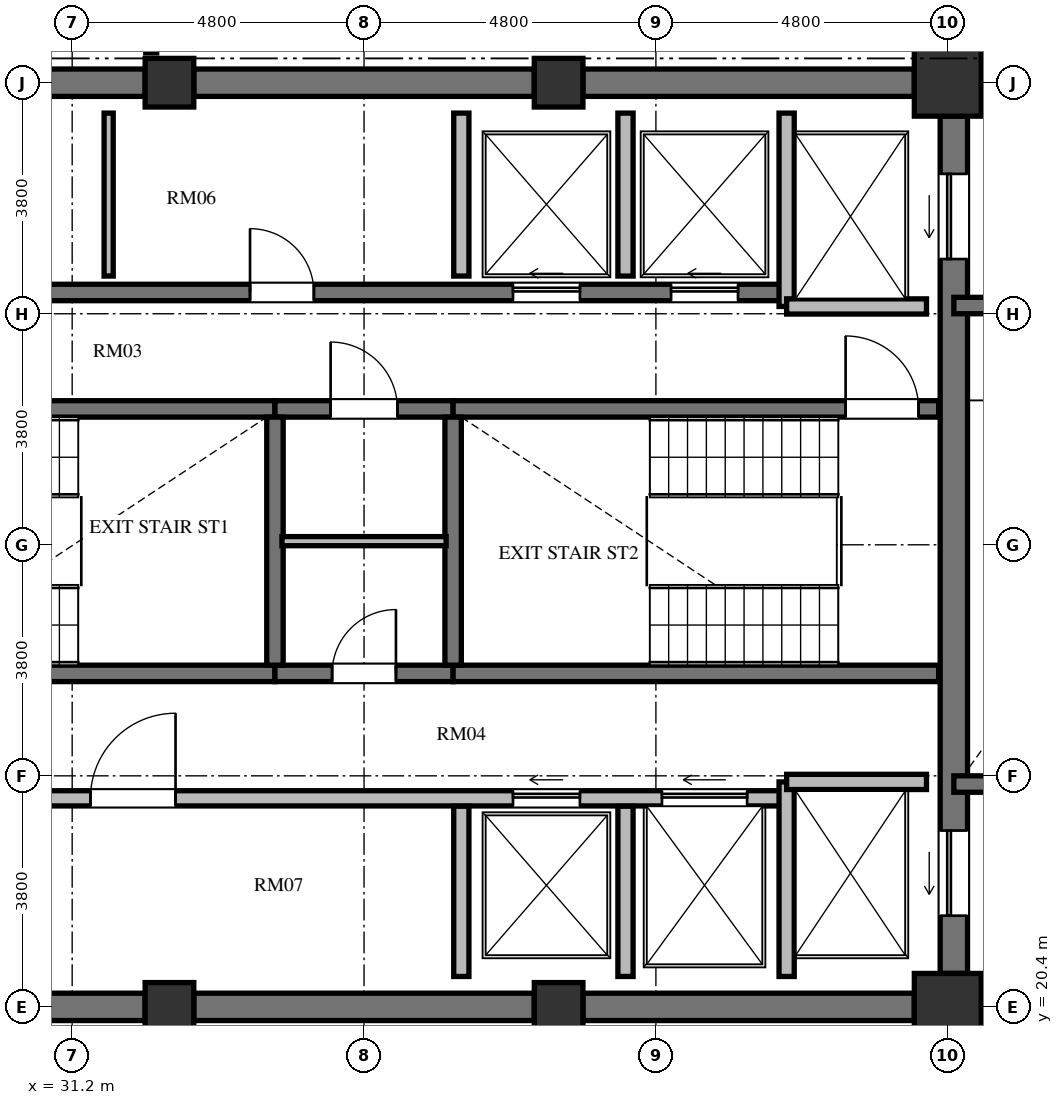
"""IFC4 building model, lengths in metres.
Left out: names, types, materials, properties, quantities, classifications, styles, units other than length and angle.
Written with IfcOpenShell. Run it as: python <this file> out.ifc"""

import sys

from ifc_helpers import new_model, si_unit, direction, frame, frame_2d, origin, origin_2d, place, context, subcontext, project, spatial, rectangle, extrude, element, fill, save


model = new_model("IFC4")
c1 = context("Model", 3, precision=1e-05, world=origin(), true_north=direction((0.0, 1.0)))
c2 = subcontext(c1, "Body", "Model", "MODEL_VIEW")
j1 = project(units=[si_unit("LENGTHUNIT", "METRE"), si_unit("PLANEANGLEUNIT", "RADIAN")], contexts=[c1])
p1 = place(None, origin())
s1 = spatial("IfcSite", under=j1, at=p1, CompositionType="ELEMENT")
p2 = place(p1, origin())
s2 = spatial("IfcBuilding", under=s1, at=p2, CompositionType="ELEMENT")
p3 = place(p2, frame((0.0, 0.0, 276.912)))
s3 = spatial("IfcBuildingStorey", under=s2, at=p3, CompositionType="ELEMENT", Elevation=276.912)
for number, where, z_axis, x_axis in (
    (1, (32.8, 20.4, 0.0), (0.0, 0.0, 1.0), (1.0, 0.0, 0.0)),
    (2, (39.2, 20.4, 0.0), (0.0, 0.0, 1.0), (1.0, 0.0, 0.0)),
):
    element("IfcColumn", number, at=place(p3, frame(where, z_axis=z_axis, x_axis=x_axis)), inside=s3, PredefinedType="COLUMN", context=c2, shape_type="SweptSolid", body=[
        extrude(rectangle(XDim=0.8, YDim=0.8, at=origin_2d()), origin(), (0.0, 0.0, 1.0), 3.648),
    ])
for number, where, z_axis, x_axis in (
    (3, (45.6, 20.4, 0.0), (0.0, 0.0, 1.0), (1.0, 0.0, 0.0)),
    (4, (45.6, 35.6, 0.0), (0.0, 0.0, 1.0), (1.0, 0.0, 0.0)),
):
    element("IfcColumn", number, at=place(p3, frame(where, z_axis=z_axis, x_axis=x_axis)), inside=s3, PredefinedType="COLUMN", context=c2, shape_type="SweptSolid", body=[
        extrude(rectangle(XDim=1.1, YDim=1.1, at=origin_2d()), origin(), (0.0, 0.0, 1.0), 3.648),
    ])
for number, where, z_axis, x_axis in (
    (5, (39.2, 35.6, 0.0), (0.0, 0.0, 1.0), (1.0, 0.0, 0.0)),
    (6, (32.8, 35.6, 0.0), (0.0, 0.0, 1.0), (1.0, 0.0, 0.0)),
):
    element("IfcColumn", number, at=place(p3, frame(where, z_axis=z_axis, x_axis=x_axis)), inside=s3, PredefinedType="COLUMN", context=c2, shape_type="SweptSolid", body=[
        extrude(rectangle(XDim=0.8, YDim=0.8, at=origin_2d()), origin(), (0.0, 0.0, 1.0), 3.648),
    ])
p4 = place(p3, frame((45.7, 20.95, 0.0), z_axis=(0.0, 0.0, 1.0), x_axis=(0.0, 1.0, 0.0)))
e7 = element("IfcWall", 7, at=p4, inside=s3, PredefinedType="SHEAR", context=c2, shape_type="SweptSolid", body=[
    extrude(rectangle(XDim=14.1, YDim=0.45, at=frame_2d((7.05, 0.0))), origin(), (0.0, 0.0, 1.0), 3.648),
])
p5 = place(p4, frame((11.75, 0.0, 0.0)))
e8 = element("IfcOpeningElement", 8, at=p5, cuts=e7, PredefinedType="OPENING", context=c2, shape_type="SweptSolid", body=[
    extrude(rectangle(XDim=1.4, YDim=2.3, at=frame_2d((0.7, 1.15))), frame((0.0, 0.235, 0.0), z_axis=(0.0, -1.0, 0.0), x_axis=(1.0, 0.0, 0.0)), (0.0, 0.0, 1.0), 0.47),
])
p6 = place(p4, frame((0.95, 0.0, 0.0)))
e9 = element("IfcOpeningElement", 9, at=p6, cuts=e7, PredefinedType="OPENING", context=c2, shape_type="SweptSolid", body=[
    extrude(rectangle(XDim=1.4, YDim=2.3, at=frame_2d((0.7, 1.15))), frame((0.0, 0.235, 0.0), z_axis=(0.0, -1.0, 0.0), x_axis=(1.0, 0.0, 0.0)), (0.0, 0.0, 1.0), 0.47),
])
for number, where, z_axis, x_axis in (
    (10, (26.95, 20.4, 0.0), (0.0, 0.0, 1.0), (1.0, 0.0, 0.0)),
    (11, (26.95, 35.6, 0.0), (0.0, 0.0, 1.0), (1.0, 0.0, 0.0)),
):
    element("IfcWall", number, at=place(p3, frame(where, z_axis=z_axis, x_axis=x_axis)), inside=s3, PredefinedType="SHEAR", context=c2, shape_type="SweptSolid", body=[
        extrude(rectangle(XDim=5.45, YDim=0.45, at=frame_2d((2.725, 0.0))), origin(), (0.0, 0.0, 1.0), 3.648),
    ])
for number, where, z_axis, x_axis in (
    (12, (33.2, 20.4, 0.0), (0.0, 0.0, 1.0), (1.0, 0.0, 0.0)),
    (13, (33.2, 35.6, 0.0), (0.0, 0.0, 1.0), (1.0, 0.0, 0.0)),
):
    element("IfcWall", number, at=place(p3, frame(where, z_axis=z_axis, x_axis=x_axis)), inside=s3, PredefinedType="SHEAR", context=c2, shape_type="SweptSolid", body=[
        extrude(rectangle(XDim=5.6, YDim=0.45, at=frame_2d((2.8, 0.0))), origin(), (0.0, 0.0, 1.0), 3.648),
    ])
for number, where, z_axis, x_axis in (
    (14, (39.6, 20.4, 0.0), (0.0, 0.0, 1.0), (1.0, 0.0, 0.0)),
    (15, (39.6, 35.6, 0.0), (0.0, 0.0, 1.0), (1.0, 0.0, 0.0)),
):
    element("IfcWall", number, at=place(p3, frame(where, z_axis=z_axis, x_axis=x_axis)), inside=s3, PredefinedType="SHEAR", context=c2, shape_type="SweptSolid", body=[
        extrude(rectangle(XDim=5.45, YDim=0.45, at=frame_2d((2.725, 0.0))), origin(), (0.0, 0.0, 1.0), 3.648),
    ])
p7 = place(p3, frame((26.55, 30.235, 0.0), z_axis=(0.0, 0.0, 1.0), x_axis=(1.0, 0.0, 0.0)))
e16 = element("IfcWall", 16, at=p7, inside=s3, PredefinedType="SHEAR", context=c2, shape_type="SweptSolid", body=[
    extrude(rectangle(XDim=7.985, YDim=0.27, at=frame_2d((3.992, 0.0))), origin(), (0.0, 0.0, 1.0), 3.648),
])
p8 = place(p3, frame((34.535, 30.235, 0.0), z_axis=(0.0, 0.0, 1.0), x_axis=(1.0, 0.0, 0.0)))
e17 = element("IfcWall", 17, at=p8, inside=s3, PredefinedType="SHEAR", context=c2, shape_type="SweptSolid", body=[
    extrude(rectangle(XDim=2.93, YDim=0.27, at=frame_2d((1.465, 0.0))), origin(), (0.0, 0.0, 1.0), 3.648),
])
p9 = place(p8, frame((0.915, 0.0, 0.0)))
e18 = element("IfcOpeningElement", 18, at=p9, cuts=e17, PredefinedType="OPENING", context=c2, shape_type="SweptSolid", body=[
    extrude(rectangle(XDim=1.1, YDim=2.15, at=frame_2d((0.55, 1.075))), frame((0.0, 0.145, 0.0), z_axis=(0.0, -1.0, 0.0), x_axis=(1.0, 0.0, 0.0)), (0.0, 0.0, 1.0), 0.29),
])
p10 = place(p3, frame((37.465, 30.235, 0.0), z_axis=(0.0, 0.0, 1.0), x_axis=(1.0, 0.0, 0.0)))
e19 = element("IfcWall", 19, at=p10, inside=s3, PredefinedType="SHEAR", context=c2, shape_type="SweptSolid", body=[
    extrude(rectangle(XDim=7.985, YDim=0.27, at=frame_2d((3.992, 0.0))), origin(), (0.0, 0.0, 1.0), 3.648),
])
p11 = place(p10, frame((6.455, 0.0, 0.0)))
e20 = element("IfcOpeningElement", 20, at=p11, cuts=e19, PredefinedType="OPENING", context=c2, shape_type="SweptSolid", body=[
    extrude(rectangle(XDim=1.2, YDim=2.15, at=frame_2d((0.6, 1.075))), frame((0.0, 0.145, 0.0), z_axis=(0.0, -1.0, 0.0), x_axis=(1.0, 0.0, 0.0)), (0.0, 0.0, 1.0), 0.29),
])
p12 = place(p3, frame((26.55, 25.885, 0.0), z_axis=(0.0, 0.0, 1.0), x_axis=(1.0, 0.0, 0.0)))
e21 = element("IfcWall", 21, at=p12, inside=s3, PredefinedType="SHEAR", context=c2, shape_type="SweptSolid", body=[
    extrude(rectangle(XDim=7.985, YDim=0.27, at=frame_2d((3.992, 0.0))), origin(), (0.0, 0.0, 1.0), 3.648),
])
p13 = place(p3, frame((34.535, 25.885, 0.0), z_axis=(0.0, 0.0, 1.0), x_axis=(1.0, 0.0, 0.0)))
e22 = element("IfcWall", 22, at=p13, inside=s3, PredefinedType="SHEAR", context=c2, shape_type="SweptSolid", body=[
    extrude(rectangle(XDim=2.93, YDim=0.27, at=frame_2d((1.465, 0.0))), origin(), (0.0, 0.0, 1.0), 3.648),
])
p14 = place(p13, frame((0.94, 0.0, 0.0)))
e23 = element("IfcOpeningElement", 23, at=p14, cuts=e22, PredefinedType="OPENING", context=c2, shape_type="SweptSolid", body=[
    extrude(rectangle(XDim=1.05, YDim=2.15, at=frame_2d((0.525, 1.075))), frame((0.0, 0.145, 0.0), z_axis=(0.0, -1.0, 0.0), x_axis=(1.0, 0.0, 0.0)), (0.0, 0.0, 1.0), 0.29),
])
p15 = place(p3, frame((37.465, 25.885, 0.0), z_axis=(0.0, 0.0, 1.0), x_axis=(1.0, 0.0, 0.0)))
e24 = element("IfcWall", 24, at=p15, inside=s3, PredefinedType="SHEAR", context=c2, shape_type="SweptSolid", body=[
    extrude(rectangle(XDim=7.985, YDim=0.27, at=frame_2d((3.992, 0.0))), origin(), (0.0, 0.0, 1.0), 3.648),
])
for number, where, z_axis, x_axis in (
    (25, (34.535, 26.02, 0.0), (0.0, 0.0, 1.0), (0.0, 1.0, 0.0)),
    (26, (37.465, 26.02, 0.0), (0.0, 0.0, 1.0), (0.0, 1.0, 0.0)),
):
    element("IfcWall", number, at=place(p3, frame(where, z_axis=z_axis, x_axis=x_axis)), inside=s3, PredefinedType="SHEAR", context=c2, shape_type="SweptSolid", body=[
        extrude(rectangle(XDim=4.08, YDim=0.27, at=frame_2d((2.04, 0.0))), origin(), (0.0, 0.0, 1.0), 3.648),
    ])
p16 = place(p3, frame((34.65, 28.06, 0.0), z_axis=(0.0, 0.0, 1.0), x_axis=(1.0, 0.0, 0.0)))
e27 = element("IfcWall", 27, at=p16, inside=s3, PredefinedType="PARTITIONING", context=c2, shape_type="SweptSolid", body=[
    extrude(rectangle(XDim=2.7, YDim=0.15, at=frame_2d((1.35, 0.0))), origin(), (0.0, 0.0, 1.0), 3.448),
])
p17 = place(p3, frame((26.55, 32.15, 0.0), z_axis=(0.0, 0.0, 1.0), x_axis=(1.0, 0.0, 0.0)))
e28 = element("IfcWall", 28, at=p17, inside=s3, PredefinedType="SHEAR", context=c2, shape_type="SweptSolid", body=[
    extrude(rectangle(XDim=16.4, YDim=0.27, at=frame_2d((8.2, 0.0))), origin(), (0.0, 0.0, 1.0), 3.648),
])
p18 = place(p17, frame((2.175, 0.0, 0.0)))
e29 = element("IfcOpeningElement", 29, at=p18, cuts=e28, PredefinedType="OPENING", context=c2, shape_type="SweptSolid", body=[
    extrude(rectangle(XDim=1.05, YDim=2.15, at=frame_2d((0.525, 1.075))), frame((0.0, 0.145, 0.0), z_axis=(0.0, -1.0, 0.0), x_axis=(1.0, 0.0, 0.0)), (0.0, 0.0, 1.0), 0.29),
])
p19 = place(p17, frame((7.575, 0.0, 0.0)))
e30 = element("IfcOpeningElement", 30, at=p19, cuts=e28, PredefinedType="OPENING", context=c2, shape_type="SweptSolid", body=[
    extrude(rectangle(XDim=1.05, YDim=2.15, at=frame_2d((0.525, 1.075))), frame((0.0, 0.145, 0.0), z_axis=(0.0, -1.0, 0.0), x_axis=(1.0, 0.0, 0.0)), (0.0, 0.0, 1.0), 0.29),
])
p20 = place(p17, frame((11.9, 0.0, 0.0)))
e31 = element("IfcOpeningElement", 31, at=p20, cuts=e28, PredefinedType="OPENING", context=c2, shape_type="SweptSolid", body=[
    extrude(rectangle(XDim=1.1, YDim=2.2, at=frame_2d((0.55, 1.1))), frame((0.0, 0.145, 0.0), z_axis=(0.0, -1.0, 0.0), x_axis=(1.0, 0.0, 0.0)), (0.0, 0.0, 1.0), 0.29),
])
p21 = place(p17, frame((14.5, 0.0, 0.0)))
e32 = element("IfcOpeningElement", 32, at=p21, cuts=e28, PredefinedType="OPENING", context=c2, shape_type="SweptSolid", body=[
    extrude(rectangle(XDim=1.1, YDim=2.2, at=frame_2d((0.55, 1.1))), frame((0.0, 0.145, 0.0), z_axis=(0.0, -1.0, 0.0), x_axis=(1.0, 0.0, 0.0)), (0.0, 0.0, 1.0), 0.29),
])
p22 = place(p3, frame((26.75, 23.83, 0.0), z_axis=(0.0, 0.0, 1.0), x_axis=(1.0, 0.0, 0.0)))
e33 = element("IfcWall", 33, at=p22, inside=s3, PredefinedType="SOLIDWALL", context=c2, shape_type="SweptSolid", body=[
    extrude(rectangle(XDim=16.2, YDim=0.25, at=frame_2d((8.1, 0.0))), origin(), (0.0, 0.0, 1.0), 3.448),
])
p23 = place(p22, frame((4.75, 0.0, 0.0)))
e34 = element("IfcOpeningElement", 34, at=p23, cuts=e33, PredefinedType="OPENING", context=c2, shape_type="SweptSolid", body=[
    extrude(rectangle(XDim=1.4, YDim=2.2, at=frame_2d((0.7, 1.1))), frame((0.0, 0.135, 0.0), z_axis=(0.0, -1.0, 0.0), x_axis=(1.0, 0.0, 0.0)), (0.0, 0.0, 1.0), 0.27),
])
p24 = place(p22, frame((11.7, 0.0, 0.0)))
e35 = element("IfcOpeningElement", 35, at=p24, cuts=e33, PredefinedType="OPENING", context=c2, shape_type="SweptSolid", body=[
    extrude(rectangle(XDim=1.1, YDim=2.2, at=frame_2d((0.55, 1.1))), frame((0.0, 0.135, 0.0), z_axis=(0.0, -1.0, 0.0), x_axis=(1.0, 0.0, 0.0)), (0.0, 0.0, 1.0), 0.27),
])
p25 = place(p22, frame((14.15, 0.0, 0.0)))
e36 = element("IfcOpeningElement", 36, at=p25, cuts=e33, PredefinedType="OPENING", context=c2, shape_type="SweptSolid", body=[
    extrude(rectangle(XDim=1.4, YDim=2.3, at=frame_2d((0.7, 1.15))), frame((0.0, 0.135, 0.0), z_axis=(0.0, -1.0, 0.0), x_axis=(1.0, 0.0, 0.0)), (0.0, 0.0, 1.0), 0.27),
])
p26 = place(p3, frame((42.95, 31.92, 0.0), z_axis=(0.0, 0.0, 1.0), x_axis=(0.0, 1.0, 0.0)))
e37 = element("IfcWall", 37, at=p26, inside=s3, PredefinedType="SOLIDWALL", context=c2, shape_type="SweptSolid", body=[
    extrude(rectangle(XDim=3.18, YDim=0.25, at=frame_2d((1.59, 0.0))), origin(), (0.0, 0.0, 1.0), 3.448),
])
p27 = place(p3, frame((42.95, 31.92, 0.0), z_axis=(0.0, 0.0, 1.0), x_axis=(1.0, 0.0, 0.0)))
e38 = element("IfcWall", 38, at=p27, inside=s3, PredefinedType="SOLIDWALL", context=c2, shape_type="SweptSolid", body=[
    extrude(rectangle(XDim=2.3, YDim=0.25, at=frame_2d((1.15, 0.0))), origin(), (0.0, 0.0, 1.0), 3.448),
])
p28 = place(p3, frame((42.95, 20.9, 0.0), z_axis=(0.0, 0.0, 1.0), x_axis=(0.0, 1.0, 0.0)))
e39 = element("IfcWall", 39, at=p28, inside=s3, PredefinedType="SOLIDWALL", context=c2, shape_type="SweptSolid", body=[
    extrude(rectangle(XDim=3.2, YDim=0.25, at=frame_2d((1.6, 0.0))), origin(), (0.0, 0.0, 1.0), 3.448),
])
p29 = place(p3, frame((42.95, 24.1, 0.0), z_axis=(0.0, 0.0, 1.0), x_axis=(1.0, 0.0, 0.0)))
e40 = element("IfcWall", 40, at=p29, inside=s3, PredefinedType="SOLIDWALL", context=c2, shape_type="SweptSolid", body=[
    extrude(rectangle(XDim=2.3, YDim=0.25, at=frame_2d((1.15, 0.0))), origin(), (0.0, 0.0, 1.0), 3.448),
])
p30 = place(p3, frame((37.6, 32.42, 0.0), z_axis=(0.0, 0.0, 1.0), x_axis=(0.0, 1.0, 0.0)))
e41 = element("IfcWall", 41, at=p30, inside=s3, PredefinedType="SOLIDWALL", context=c2, shape_type="SweptSolid", body=[
    extrude(rectangle(XDim=2.68, YDim=0.25, at=frame_2d((1.34, 0.0))), origin(), (0.0, 0.0, 1.0), 3.448),
])
p31 = place(p3, frame((37.6, 20.9, 0.0), z_axis=(0.0, 0.0, 1.0), x_axis=(0.0, 1.0, 0.0)))
e42 = element("IfcWall", 42, at=p31, inside=s3, PredefinedType="SOLIDWALL", context=c2, shape_type="SweptSolid", body=[
    extrude(rectangle(XDim=2.8, YDim=0.25, at=frame_2d((1.4, 0.0))), origin(), (0.0, 0.0, 1.0), 3.448),
])
p32 = place(p3, frame((40.3, 32.42, 0.0), z_axis=(0.0, 0.0, 1.0), x_axis=(0.0, 1.0, 0.0)))
e43 = element("IfcWall", 43, at=p32, inside=s3, PredefinedType="SOLIDWALL", context=c2, shape_type="SweptSolid", body=[
    extrude(rectangle(XDim=2.68, YDim=0.25, at=frame_2d((1.34, 0.0))), origin(), (0.0, 0.0, 1.0), 3.448),
])
p33 = place(p3, frame((40.3, 20.9, 0.0), z_axis=(0.0, 0.0, 1.0), x_axis=(0.0, 1.0, 0.0)))
e44 = element("IfcWall", 44, at=p33, inside=s3, PredefinedType="SOLIDWALL", context=c2, shape_type="SweptSolid", body=[
    extrude(rectangle(XDim=2.8, YDim=0.25, at=frame_2d((1.4, 0.0))), origin(), (0.0, 0.0, 1.0), 3.448),
])
p34 = place(p3, frame((31.8, 32.42, 0.0), z_axis=(0.0, 0.0, 1.0), x_axis=(0.0, 1.0, 0.0)))
e45 = element("IfcWall", 45, at=p34, inside=s3, PredefinedType="PARTITIONING", context=c2, shape_type="SweptSolid", body=[
    extrude(rectangle(XDim=2.68, YDim=0.15, at=frame_2d((1.34, 0.0))), origin(), (0.0, 0.0, 1.0), 3.448),
])
p35 = place(p3, frame((45.925, 35.98, 0.0), z_axis=(0.0, 0.0, 1.0), x_axis=(1.0, 0.0, 0.0)))
e46 = element("IfcWall", 46, at=p35, inside=s3, PredefinedType="SHEAR", context=c2, shape_type="SweptSolid", body=[
    extrude(rectangle(XDim=4.625, YDim=0.27, at=frame_2d((2.312, 0.0))), origin(), (0.0, 0.0, 1.0), 3.648),
])
for number, where, z_axis, x_axis in (
    (47, (45.7, 31.935, 0.0), (0.0, 0.0, 1.0), (1.0, 0.0, 0.0)),
    (48, (45.7, 24.065, 0.0), (0.0, 0.0, 1.0), (1.0, 0.0, 0.0)),
):
    element("IfcWall", number, at=place(p3, frame(where, z_axis=z_axis, x_axis=x_axis)), inside=s3, PredefinedType="SHEAR", context=c2, shape_type="SweptSolid", body=[
        extrude(rectangle(XDim=4.715, YDim=0.27, at=frame_2d((2.357, 0.0))), origin(), (0.0, 0.0, 1.0), 3.648),
    ])
p36 = place(p3, frame((45.7, 20.02, 0.0), z_axis=(0.0, 0.0, 1.0), x_axis=(1.0, 0.0, 0.0)))
e49 = element("IfcWall", 49, at=p36, inside=s3, PredefinedType="SOLIDWALL", context=c2, shape_type="SweptSolid", body=[
    extrude(rectangle(XDim=4.715, YDim=0.25, at=frame_2d((2.357, 0.0))), origin(), (0.0, 0.0, 1.0), 3.448),
])
p37 = place(p3, frame((32.5, 36.09, 0.0), z_axis=(0.0, 0.0, 1.0), x_axis=(0.0, 1.0, 0.0)))
e50 = element("IfcWall", 50, at=p37, inside=s3, PredefinedType="PARTITIONING", context=c2, shape_type="SweptSolid", body=[
    extrude(rectangle(XDim=2.35, YDim=0.18, at=frame_2d((1.175, 0.0))), origin(), (0.0, 0.0, 1.0), 3.448),
])
p38 = place(p11, origin())
e51 = element("IfcDoor", 51, at=p38, inside=s3, OperationType="SINGLE_SWING_LEFT", PredefinedType="DOOR", context=c2, shape_type="SweptSolid", body=[
    extrude(rectangle(XDim=1.2, YDim=2.15, at=frame_2d((0.6, 1.075))), frame((0.0, 0.025, 0.0), z_axis=(0.0, -1.0, 0.0), x_axis=(1.0, 0.0, 0.0)), (0.0, 0.0, 1.0), 0.05),
])
fill(e20, e51)
p39 = place(p14, origin())
e52 = element("IfcDoor", 52, at=p39, inside=s3, OperationType="SINGLE_SWING_RIGHT", PredefinedType="DOOR", context=c2, shape_type="SweptSolid", body=[
    extrude(rectangle(XDim=1.05, YDim=2.15, at=frame_2d((0.525, 1.075))), frame((0.0, 0.025, 0.0), z_axis=(0.0, -1.0, 0.0), x_axis=(1.0, 0.0, 0.0)), (0.0, 0.0, 1.0), 0.05),
])
fill(e23, e52)
p40 = place(p9, origin())
e53 = element("IfcDoor", 53, at=p40, inside=s3, OperationType="SINGLE_SWING_LEFT", PredefinedType="DOOR", context=c2, shape_type="SweptSolid", body=[
    extrude(rectangle(XDim=1.1, YDim=2.15, at=frame_2d((0.55, 1.075))), frame((0.0, 0.025, 0.0), z_axis=(0.0, -1.0, 0.0), x_axis=(1.0, 0.0, 0.0)), (0.0, 0.0, 1.0), 0.05),
])
fill(e18, e53)
p41 = place(p19, origin())
e54 = element("IfcDoor", 54, at=p41, inside=s3, OperationType="SINGLE_SWING_LEFT", PredefinedType="DOOR", context=c2, shape_type="SweptSolid", body=[
    extrude(rectangle(XDim=1.05, YDim=2.15, at=frame_2d((0.525, 1.075))), frame((0.0, 0.025, 0.0), z_axis=(0.0, -1.0, 0.0), x_axis=(1.0, 0.0, 0.0)), (0.0, 0.0, 1.0), 0.05),
])
fill(e30, e54)
p42 = place(p23, origin())
e55 = element("IfcDoor", 55, at=p42, inside=s3, OperationType="SINGLE_SWING_RIGHT", PredefinedType="DOOR", context=c2, shape_type="SweptSolid", body=[
    extrude(rectangle(XDim=1.4, YDim=2.2, at=frame_2d((0.7, 1.1))), frame((0.0, 0.025, 0.0), z_axis=(0.0, -1.0, 0.0), x_axis=(1.0, 0.0, 0.0)), (0.0, 0.0, 1.0), 0.05),
])
fill(e34, e55)
p43 = place(p20, origin())
e56 = element("IfcDoor", 56, at=p43, inside=s3, OperationType="SLIDING_TO_LEFT", PredefinedType="DOOR", context=c2, shape_type="SweptSolid", body=[
    extrude(rectangle(XDim=1.1, YDim=2.2, at=frame_2d((0.55, 1.1))), frame((0.0, 0.025, 0.0), z_axis=(0.0, -1.0, 0.0), x_axis=(1.0, 0.0, 0.0)), (0.0, 0.0, 1.0), 0.05),
])
fill(e31, e56)
p44 = place(p21, origin())
e57 = element("IfcDoor", 57, at=p44, inside=s3, OperationType="SLIDING_TO_LEFT", PredefinedType="DOOR", context=c2, shape_type="SweptSolid", body=[
    extrude(rectangle(XDim=1.1, YDim=2.2, at=frame_2d((0.55, 1.1))), frame((0.0, 0.025, 0.0), z_axis=(0.0, -1.0, 0.0), x_axis=(1.0, 0.0, 0.0)), (0.0, 0.0, 1.0), 0.05),
])
fill(e32, e57)
p45 = place(p24, origin())
e58 = element("IfcDoor", 58, at=p45, inside=s3, OperationType="SLIDING_TO_LEFT", PredefinedType="DOOR", context=c2, shape_type="SweptSolid", body=[
    extrude(rectangle(XDim=1.1, YDim=2.2, at=frame_2d((0.55, 1.1))), frame((0.0, 0.025, 0.0), z_axis=(0.0, -1.0, 0.0), x_axis=(1.0, 0.0, 0.0)), (0.0, 0.0, 1.0), 0.05),
])
fill(e35, e58)
p46 = place(p5, origin())
e59 = element("IfcDoor", 59, at=p46, inside=s3, OperationType="SLIDING_TO_LEFT", PredefinedType="DOOR", context=c2, shape_type="SweptSolid", body=[
    extrude(rectangle(XDim=1.4, YDim=2.3, at=frame_2d((0.7, 1.15))), frame((0.0, 0.025, 0.0), z_axis=(0.0, -1.0, 0.0), x_axis=(1.0, 0.0, 0.0)), (0.0, 0.0, 1.0), 0.05),
])
fill(e8, e59)
p47 = place(p6, origin())
e60 = element("IfcDoor", 60, at=p47, inside=s3, OperationType="SLIDING_TO_LEFT", PredefinedType="DOOR", context=c2, shape_type="SweptSolid", body=[
    extrude(rectangle(XDim=1.4, YDim=2.3, at=frame_2d((0.7, 1.15))), frame((0.0, 0.025, 0.0), z_axis=(0.0, -1.0, 0.0), x_axis=(1.0, 0.0, 0.0)), (0.0, 0.0, 1.0), 0.05),
])
fill(e9, e60)
p48 = place(p25, origin())
e61 = element("IfcDoor", 61, at=p48, inside=s3, OperationType="SLIDING_TO_LEFT", PredefinedType="DOOR", context=c2, shape_type="SweptSolid", body=[
    extrude(rectangle(XDim=1.4, YDim=2.3, at=frame_2d((0.7, 1.15))), frame((0.0, 0.025, 0.0), z_axis=(0.0, -1.0, 0.0), x_axis=(1.0, 0.0, 0.0)), (0.0, 0.0, 1.0), 0.05),
])
fill(e36, e61)
save(model, sys.argv[1])
